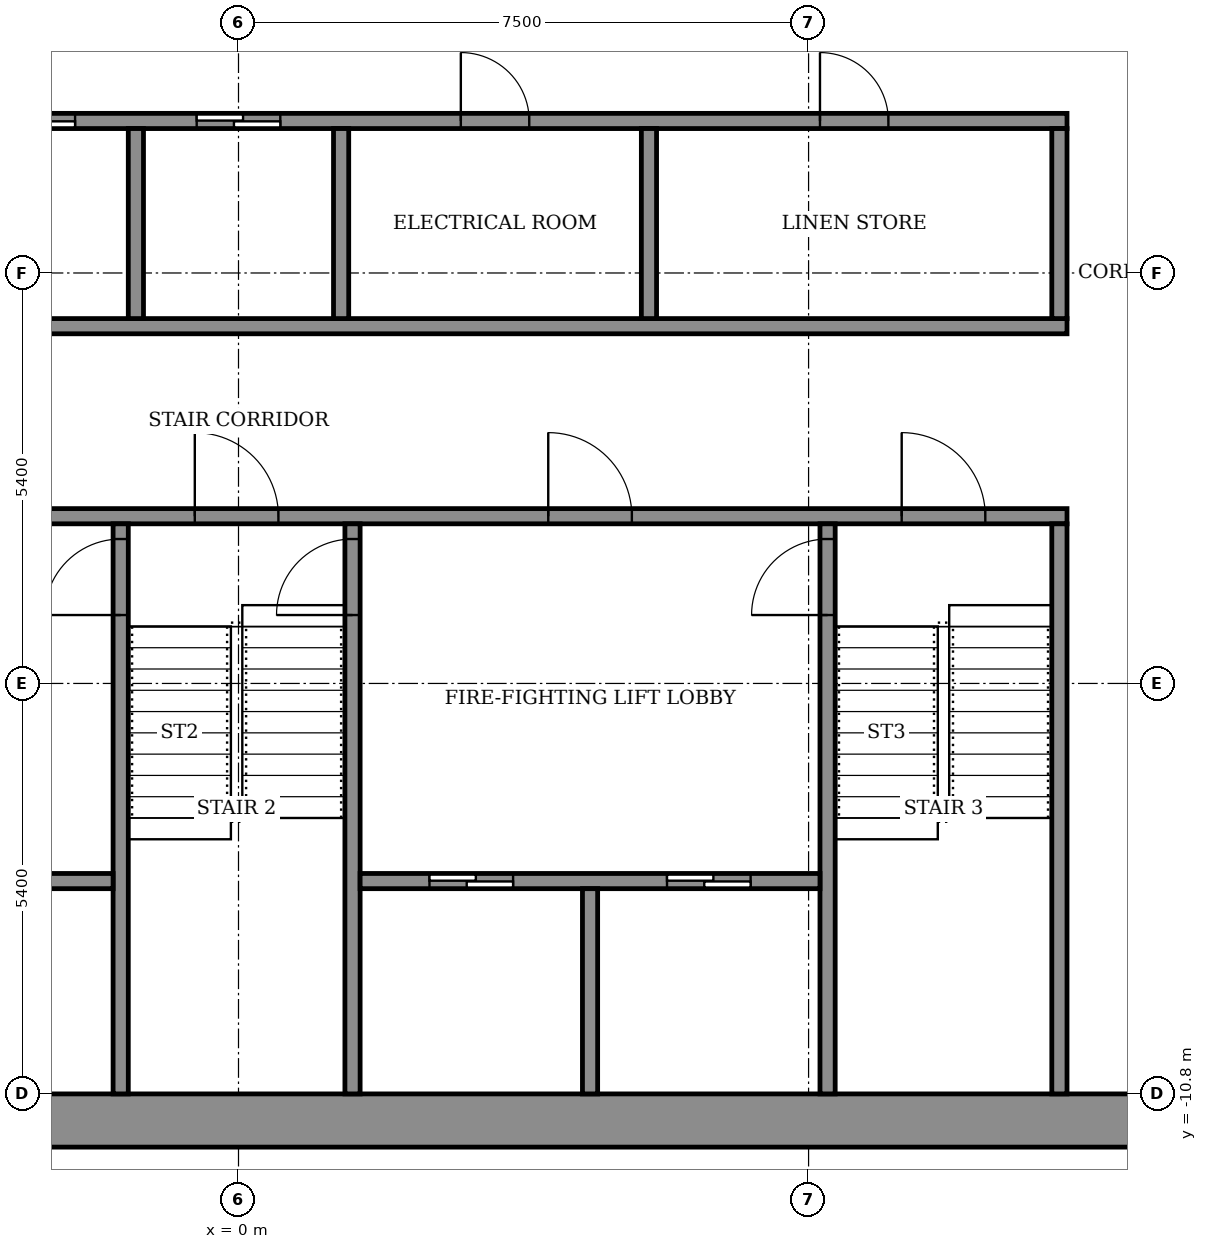
"""IFC4 building model, lengths in metres.
Left out: names, types, materials, properties, quantities, classifications, styles, units other than length and angle.
Written with IfcOpenShell. Run it as: python <this file> out.ifc"""

import sys

from ifc_helpers import new_model, si_unit, direction, frame, frame_2d, origin, place, context, subcontext, project, spatial, rectangle, extrude, element, fill, save


model = new_model("IFC4")
c1 = context("Model", 3, precision=1e-05, world=origin(), true_north=direction((0.0, 1.0)))
c2 = subcontext(c1, "Body", "Model", "MODEL_VIEW")
j1 = project(units=[si_unit("LENGTHUNIT", "METRE"), si_unit("PLANEANGLEUNIT", "RADIAN")], contexts=[c1])
p1 = place(None, origin())
s1 = spatial("IfcSite", under=j1, at=p1, CompositionType="ELEMENT")
p2 = place(p1, origin())
s2 = spatial("IfcBuilding", under=s1, at=p2, CompositionType="ELEMENT")
p3 = place(p2, frame((0.0, 0.0, 271.7)))
s3 = spatial("IfcBuildingStorey", under=s2, at=p3, CompositionType="ELEMENT", Elevation=271.7)
p4 = place(p3, frame((-14.5, -11.15, 0.0), z_axis=(0.0, 0.0, 1.0), x_axis=(1.0, 0.0, 0.0)))
e1 = element("IfcWall", 1, at=p4, inside=s3, PredefinedType="SHEAR", context=c2, shape_type="SweptSolid", body=[
    extrude(rectangle(XDim=29.0, YDim=0.7, at=frame_2d((14.5, 0.0))), origin(), (0.0, 0.0, 1.0), 3.6),
])
p5 = place(p3, frame((-10.9, -3.2, 0.0), z_axis=(0.0, 0.0, 1.0), x_axis=(1.0, 0.0, 0.0)))
e2 = element("IfcWall", 2, at=p5, inside=s3, PredefinedType="SHEAR", context=c2, shape_type="SweptSolid", body=[
    extrude(rectangle(XDim=21.8, YDim=0.2, at=frame_2d((10.9, 0.0))), origin(), (0.0, 0.0, 1.0), 3.05),
])
p6 = place(p5, frame((1.075, 0.0, 0.0)))
e3 = element("IfcOpeningElement", 3, at=p6, cuts=e2, PredefinedType="OPENING", context=c2, shape_type="SweptSolid", body=[
    extrude(rectangle(XDim=1.1, YDim=2.1, at=frame_2d((0.55, 1.05))), frame((0.0, 0.11, 0.0), z_axis=(0.0, -1.0, 0.0), x_axis=(1.0, 0.0, 0.0)), (0.0, 0.0, 1.0), 0.22),
])
p7 = place(p5, frame((10.325, 0.0, 0.0)))
e4 = element("IfcOpeningElement", 4, at=p7, cuts=e2, PredefinedType="OPENING", context=c2, shape_type="SweptSolid", body=[
    extrude(rectangle(XDim=1.1, YDim=2.1, at=frame_2d((0.55, 1.05))), frame((0.0, 0.11, 0.0), z_axis=(0.0, -1.0, 0.0), x_axis=(1.0, 0.0, 0.0)), (0.0, 0.0, 1.0), 0.22),
])
p8 = place(p5, frame((19.625, 0.0, 0.0)))
e5 = element("IfcOpeningElement", 5, at=p8, cuts=e2, PredefinedType="OPENING", context=c2, shape_type="SweptSolid", body=[
    extrude(rectangle(XDim=1.1, YDim=2.1, at=frame_2d((0.55, 1.05))), frame((0.0, 0.11, 0.0), z_axis=(0.0, -1.0, 0.0), x_axis=(1.0, 0.0, 0.0)), (0.0, 0.0, 1.0), 0.22),
])
p9 = place(p5, frame((5.7, 0.0, 0.0)))
e6 = element("IfcOpeningElement", 6, at=p9, cuts=e2, PredefinedType="OPENING", context=c2, shape_type="SweptSolid", body=[
    extrude(rectangle(XDim=1.1, YDim=2.1, at=frame_2d((0.55, 1.05))), frame((0.0, 0.11, 0.0), z_axis=(0.0, -1.0, 0.0), x_axis=(1.0, 0.0, 0.0)), (0.0, 0.0, 1.0), 0.22),
])
p10 = place(p5, frame((14.975, 0.0, 0.0)))
e7 = element("IfcOpeningElement", 7, at=p10, cuts=e2, PredefinedType="OPENING", context=c2, shape_type="SweptSolid", body=[
    extrude(rectangle(XDim=1.1, YDim=2.1, at=frame_2d((0.55, 1.05))), frame((0.0, 0.11, 0.0), z_axis=(0.0, -1.0, 0.0), x_axis=(1.0, 0.0, 0.0)), (0.0, 0.0, 1.0), 0.22),
])
p11 = place(p3, frame((-10.9, -0.7, 0.0), z_axis=(0.0, 0.0, 1.0), x_axis=(1.0, 0.0, 0.0)))
e8 = element("IfcWall", 8, at=p11, inside=s3, PredefinedType="SHEAR", context=c2, shape_type="SweptSolid", body=[
    extrude(rectangle(XDim=21.8, YDim=0.2, at=frame_2d((10.9, 0.0))), origin(), (0.0, 0.0, 1.0), 3.05),
])
p12 = place(p3, frame((-10.9, 2.0, 0.0), z_axis=(0.0, 0.0, 1.0), x_axis=(1.0, 0.0, 0.0)))
e9 = element("IfcWall", 9, at=p12, inside=s3, PredefinedType="SHEAR", context=c2, shape_type="SweptSolid", body=[
    extrude(rectangle(XDim=21.8, YDim=0.2, at=frame_2d((10.9, 0.0))), origin(), (0.0, 0.0, 1.0), 3.05),
])
p13 = place(p12, frame((4.95, 0.0, 0.0)))
e10 = element("IfcOpeningElement", 10, at=p13, cuts=e9, PredefinedType="OPENING", context=c2, shape_type="SweptSolid", body=[
    extrude(rectangle(XDim=1.1, YDim=2.1, at=frame_2d((0.55, 1.05))), frame((0.0, 0.11, 0.0), z_axis=(0.0, -1.0, 0.0), x_axis=(1.0, 0.0, 0.0)), (0.0, 0.0, 1.0), 0.22),
])
p14 = place(p12, frame((7.65, 0.0, 0.0)))
e11 = element("IfcOpeningElement", 11, at=p14, cuts=e9, PredefinedType="OPENING", context=c2, shape_type="SweptSolid", body=[
    extrude(rectangle(XDim=1.1, YDim=2.1, at=frame_2d((0.55, 1.05))), frame((0.0, 0.11, 0.0), z_axis=(0.0, -1.0, 0.0), x_axis=(1.0, 0.0, 0.0)), (0.0, 0.0, 1.0), 0.22),
])
p15 = place(p12, frame((10.35, 0.0, 0.0)))
e12 = element("IfcOpeningElement", 12, at=p15, cuts=e9, PredefinedType="OPENING", context=c2, shape_type="SweptSolid", body=[
    extrude(rectangle(XDim=1.1, YDim=2.1, at=frame_2d((0.55, 1.05))), frame((0.0, 0.11, 0.0), z_axis=(0.0, -1.0, 0.0), x_axis=(1.0, 0.0, 0.0)), (0.0, 0.0, 1.0), 0.22),
])
p16 = place(p12, frame((1.675, 0.0, 0.0)))
e13 = element("IfcOpeningElement", 13, at=p16, cuts=e9, PredefinedType="OPENING", context=c2, shape_type="SweptSolid", body=[
    extrude(rectangle(XDim=0.9, YDim=2.1, at=frame_2d((0.45, 1.05))), frame((0.0, 0.11, 0.0), z_axis=(0.0, -1.0, 0.0), x_axis=(1.0, 0.0, 0.0)), (0.0, 0.0, 1.0), 0.22),
])
p17 = place(p12, frame((13.825, 0.0, 0.0)))
e14 = element("IfcOpeningElement", 14, at=p17, cuts=e9, PredefinedType="OPENING", context=c2, shape_type="SweptSolid", body=[
    extrude(rectangle(XDim=0.9, YDim=2.1, at=frame_2d((0.45, 1.05))), frame((0.0, 0.11, 0.0), z_axis=(0.0, -1.0, 0.0), x_axis=(1.0, 0.0, 0.0)), (0.0, 0.0, 1.0), 0.22),
])
p18 = place(p12, frame((18.55, 0.0, 0.0)))
e15 = element("IfcOpeningElement", 15, at=p18, cuts=e9, PredefinedType="OPENING", context=c2, shape_type="SweptSolid", body=[
    extrude(rectangle(XDim=0.9, YDim=2.1, at=frame_2d((0.45, 1.05))), frame((0.0, 0.11, 0.0), z_axis=(0.0, -1.0, 0.0), x_axis=(1.0, 0.0, 0.0)), (0.0, 0.0, 1.0), 0.22),
])
p19 = place(p3, frame((-1.55, -10.8, 0.0), z_axis=(0.0, 0.0, 1.0), x_axis=(0.0, 1.0, 0.0)))
e16 = element("IfcWall", 16, at=p19, inside=s3, PredefinedType="SHEAR", context=c2, shape_type="SweptSolid", body=[
    extrude(rectangle(XDim=7.5, YDim=0.2, at=frame_2d((3.75, 0.0))), origin(), (0.0, 0.0, 1.0), 3.05),
])
p20 = place(p19, frame((6.3, 0.0, 0.0)))
e17 = element("IfcOpeningElement", 17, at=p20, cuts=e16, PredefinedType="OPENING", context=c2, shape_type="SweptSolid", body=[
    extrude(rectangle(XDim=1.0, YDim=2.1, at=frame_2d((0.5, 1.05))), frame((0.0, 0.11, 0.0), z_axis=(0.0, -1.0, 0.0), x_axis=(1.0, 0.0, 0.0)), (0.0, 0.0, 1.0), 0.22),
])
p21 = place(p3, frame((1.5, -10.8, 0.0), z_axis=(0.0, 0.0, 1.0), x_axis=(0.0, 1.0, 0.0)))
e18 = element("IfcWall", 18, at=p21, inside=s3, PredefinedType="SHEAR", context=c2, shape_type="SweptSolid", body=[
    extrude(rectangle(XDim=7.5, YDim=0.2, at=frame_2d((3.75, 0.0))), origin(), (0.0, 0.0, 1.0), 3.05),
])
p22 = place(p21, frame((6.3, 0.0, 0.0)))
e19 = element("IfcOpeningElement", 19, at=p22, cuts=e18, PredefinedType="OPENING", context=c2, shape_type="SweptSolid", body=[
    extrude(rectangle(XDim=1.0, YDim=2.1, at=frame_2d((0.5, 1.05))), frame((0.0, 0.11, 0.0), z_axis=(0.0, -1.0, 0.0), x_axis=(1.0, 0.0, 0.0)), (0.0, 0.0, 1.0), 0.22),
])
p23 = place(p3, frame((7.75, -10.8, 0.0), z_axis=(0.0, 0.0, 1.0), x_axis=(0.0, 1.0, 0.0)))
e20 = element("IfcWall", 20, at=p23, inside=s3, PredefinedType="SHEAR", context=c2, shape_type="SweptSolid", body=[
    extrude(rectangle(XDim=7.5, YDim=0.2, at=frame_2d((3.75, 0.0))), origin(), (0.0, 0.0, 1.0), 3.05),
])
p24 = place(p23, frame((6.3, 0.0, 0.0)))
e21 = element("IfcOpeningElement", 21, at=p24, cuts=e20, PredefinedType="OPENING", context=c2, shape_type="SweptSolid", body=[
    extrude(rectangle(XDim=1.0, YDim=2.1, at=frame_2d((0.5, 1.05))), frame((0.0, 0.11, 0.0), z_axis=(0.0, -1.0, 0.0), x_axis=(1.0, 0.0, 0.0)), (0.0, 0.0, 1.0), 0.22),
])
p25 = place(p3, frame((10.8, -10.8, 0.0), z_axis=(0.0, 0.0, 1.0), x_axis=(0.0, 1.0, 0.0)))
e22 = element("IfcWall", 22, at=p25, inside=s3, PredefinedType="SHEAR", context=c2, shape_type="SweptSolid", body=[
    extrude(rectangle(XDim=7.5, YDim=0.2, at=frame_2d((3.75, 0.0))), origin(), (0.0, 0.0, 1.0), 3.05),
])
p26 = place(p3, frame((-7.65, -8.0, 0.0), z_axis=(0.0, 0.0, 1.0), x_axis=(1.0, 0.0, 0.0)))
e23 = element("IfcWall", 23, at=p26, inside=s3, PredefinedType="SHEAR", context=c2, shape_type="SweptSolid", body=[
    extrude(rectangle(XDim=6.0, YDim=0.2, at=frame_2d((3.0, 0.0))), origin(), (0.0, 0.0, 1.0), 3.05),
])
p27 = place(p26, frame((0.9, 0.0, 0.0)))
e24 = element("IfcOpeningElement", 24, at=p27, cuts=e23, PredefinedType="OPENING", context=c2, shape_type="SweptSolid", body=[
    extrude(rectangle(XDim=1.1, YDim=2.1, at=frame_2d((0.55, 1.05))), frame((0.0, 0.11, 0.0), z_axis=(0.0, -1.0, 0.0), x_axis=(1.0, 0.0, 0.0)), (0.0, 0.0, 1.0), 0.22),
])
p28 = place(p26, frame((4.0, 0.0, 0.0)))
e25 = element("IfcOpeningElement", 25, at=p28, cuts=e23, PredefinedType="OPENING", context=c2, shape_type="SweptSolid", body=[
    extrude(rectangle(XDim=1.1, YDim=2.1, at=frame_2d((0.55, 1.05))), frame((0.0, 0.11, 0.0), z_axis=(0.0, -1.0, 0.0), x_axis=(1.0, 0.0, 0.0)), (0.0, 0.0, 1.0), 0.22),
])
p29 = place(p3, frame((1.6, -8.0, 0.0), z_axis=(0.0, 0.0, 1.0), x_axis=(1.0, 0.0, 0.0)))
e26 = element("IfcWall", 26, at=p29, inside=s3, PredefinedType="SHEAR", context=c2, shape_type="SweptSolid", body=[
    extrude(rectangle(XDim=6.05, YDim=0.2, at=frame_2d((3.025, 0.0))), origin(), (0.0, 0.0, 1.0), 3.05),
])
p30 = place(p29, frame((0.913, 0.0, 0.0)))
e27 = element("IfcOpeningElement", 27, at=p30, cuts=e26, PredefinedType="OPENING", context=c2, shape_type="SweptSolid", body=[
    extrude(rectangle(XDim=1.1, YDim=2.1, at=frame_2d((0.55, 1.05))), frame((0.0, 0.11, 0.0), z_axis=(0.0, -1.0, 0.0), x_axis=(1.0, 0.0, 0.0)), (0.0, 0.0, 1.0), 0.22),
])
p31 = place(p29, frame((4.038, 0.0, 0.0)))
e28 = element("IfcOpeningElement", 28, at=p31, cuts=e26, PredefinedType="OPENING", context=c2, shape_type="SweptSolid", body=[
    extrude(rectangle(XDim=1.1, YDim=2.1, at=frame_2d((0.55, 1.05))), frame((0.0, 0.11, 0.0), z_axis=(0.0, -1.0, 0.0), x_axis=(1.0, 0.0, 0.0)), (0.0, 0.0, 1.0), 0.22),
])
p32 = place(p3, frame((4.625, -10.8, 0.0), z_axis=(0.0, 0.0, 1.0), x_axis=(0.0, 1.0, 0.0)))
e29 = element("IfcWall", 29, at=p32, inside=s3, PredefinedType="SHEAR", context=c2, shape_type="SweptSolid", body=[
    extrude(rectangle(XDim=2.7, YDim=0.2, at=frame_2d((1.35, 0.0))), origin(), (0.0, 0.0, 1.0), 3.05),
])
for number, where, z_axis, x_axis in (
    (30, (-1.35, -0.6, 0.0), (0.0, 0.0, 1.0), (0.0, 1.0, 0.0)),
    (31, (1.35, -0.6, 0.0), (0.0, 0.0, 1.0), (0.0, 1.0, 0.0)),
):
    element("IfcWall", number, at=place(p3, frame(where, z_axis=z_axis, x_axis=x_axis)), inside=s3, PredefinedType="SHEAR", context=c2, shape_type="SweptSolid", body=[
        extrude(rectangle(XDim=2.5, YDim=0.2, at=frame_2d((1.25, 0.0))), origin(), (0.0, 0.0, 1.0), 3.05),
    ])
for number, where, z_axis, x_axis in (
    (32, (5.4, -0.6, 0.0), (0.0, 0.0, 1.0), (0.0, 1.0, 0.0)),
    (33, (10.8, -0.6, 0.0), (0.0, 0.0, 1.0), (0.0, 1.0, 0.0)),
):
    element("IfcWall", number, at=place(p3, frame(where, z_axis=z_axis, x_axis=x_axis)), inside=s3, PredefinedType="STANDARD", context=c2, shape_type="SweptSolid", body=[
        extrude(rectangle(XDim=2.5, YDim=0.2, at=frame_2d((1.25, 0.0))), origin(), (0.0, 0.0, 1.0), 3.05),
    ])
p33 = place(p14, origin())
e34 = element("IfcDoor", 34, at=p33, inside=s3, OperationType="SLIDING_TO_LEFT", PredefinedType="DOOR", context=c2, shape_type="SweptSolid", body=[
    extrude(rectangle(XDim=1.1, YDim=2.1, at=frame_2d((0.55, 1.05))), frame((0.0, 0.025, 0.0), z_axis=(0.0, -1.0, 0.0), x_axis=(1.0, 0.0, 0.0)), (0.0, 0.0, 1.0), 0.05),
])
fill(e11, e34)
p34 = place(p15, origin())
e35 = element("IfcDoor", 35, at=p34, inside=s3, OperationType="SLIDING_TO_LEFT", PredefinedType="DOOR", context=c2, shape_type="SweptSolid", body=[
    extrude(rectangle(XDim=1.1, YDim=2.1, at=frame_2d((0.55, 1.05))), frame((0.0, 0.025, 0.0), z_axis=(0.0, -1.0, 0.0), x_axis=(1.0, 0.0, 0.0)), (0.0, 0.0, 1.0), 0.05),
])
fill(e12, e35)
p35 = place(p17, origin())
e36 = element("IfcDoor", 36, at=p35, inside=s3, OperationType="SINGLE_SWING_LEFT", PredefinedType="DOOR", context=c2, shape_type="SweptSolid", body=[
    extrude(rectangle(XDim=0.9, YDim=2.1, at=frame_2d((0.45, 1.05))), frame((0.0, 0.025, 0.0), z_axis=(0.0, -1.0, 0.0), x_axis=(1.0, 0.0, 0.0)), (0.0, 0.0, 1.0), 0.05),
])
fill(e14, e36)
p36 = place(p18, origin())
e37 = element("IfcDoor", 37, at=p36, inside=s3, OperationType="SINGLE_SWING_RIGHT", PredefinedType="DOOR", context=c2, shape_type="SweptSolid", body=[
    extrude(rectangle(XDim=0.9, YDim=2.1, at=frame_2d((0.45, 1.05))), frame((0.0, 0.025, 0.0), z_axis=(0.0, -1.0, 0.0), x_axis=(1.0, 0.0, 0.0)), (0.0, 0.0, 1.0), 0.05),
])
fill(e15, e37)
p37 = place(p30, origin())
e38 = element("IfcDoor", 38, at=p37, inside=s3, OperationType="SLIDING_TO_LEFT", PredefinedType="DOOR", context=c2, shape_type="SweptSolid", body=[
    extrude(rectangle(XDim=1.1, YDim=2.1, at=frame_2d((0.55, 1.05))), frame((0.0, 0.025, 0.0), z_axis=(0.0, -1.0, 0.0), x_axis=(1.0, 0.0, 0.0)), (0.0, 0.0, 1.0), 0.05),
])
fill(e27, e38)
p38 = place(p31, origin())
e39 = element("IfcDoor", 39, at=p38, inside=s3, OperationType="SLIDING_TO_LEFT", PredefinedType="DOOR", context=c2, shape_type="SweptSolid", body=[
    extrude(rectangle(XDim=1.1, YDim=2.1, at=frame_2d((0.55, 1.05))), frame((0.0, 0.025, 0.0), z_axis=(0.0, -1.0, 0.0), x_axis=(1.0, 0.0, 0.0)), (0.0, 0.0, 1.0), 0.05),
])
fill(e28, e39)
p39 = place(p7, origin())
e40 = element("IfcDoor", 40, at=p39, inside=s3, OperationType="SINGLE_SWING_RIGHT", PredefinedType="DOOR", context=c2, shape_type="SweptSolid", body=[
    extrude(rectangle(XDim=1.1, YDim=2.1, at=frame_2d((0.55, 1.05))), frame((0.0, 0.025, 0.0), z_axis=(0.0, -1.0, 0.0), x_axis=(1.0, 0.0, 0.0)), (0.0, 0.0, 1.0), 0.05),
])
fill(e4, e40)
p40 = place(p8, origin())
e41 = element("IfcDoor", 41, at=p40, inside=s3, OperationType="SINGLE_SWING_RIGHT", PredefinedType="DOOR", context=c2, shape_type="SweptSolid", body=[
    extrude(rectangle(XDim=1.1, YDim=2.1, at=frame_2d((0.55, 1.05))), frame((0.0, 0.025, 0.0), z_axis=(0.0, -1.0, 0.0), x_axis=(1.0, 0.0, 0.0)), (0.0, 0.0, 1.0), 0.05),
])
fill(e5, e41)
p41 = place(p10, origin())
e42 = element("IfcDoor", 42, at=p41, inside=s3, OperationType="SINGLE_SWING_LEFT", PredefinedType="DOOR", context=c2, shape_type="SweptSolid", body=[
    extrude(rectangle(XDim=1.1, YDim=2.1, at=frame_2d((0.55, 1.05))), frame((0.0, 0.025, 0.0), z_axis=(0.0, -1.0, 0.0), x_axis=(1.0, 0.0, 0.0)), (0.0, 0.0, 1.0), 0.05),
])
fill(e7, e42)
p42 = place(p20, origin())
e43 = element("IfcDoor", 43, at=p42, inside=s3, OperationType="SINGLE_SWING_RIGHT", PredefinedType="DOOR", context=c2, shape_type="SweptSolid", body=[
    extrude(rectangle(XDim=1.0, YDim=2.1, at=frame_2d((0.5, 1.05))), frame((0.0, 0.025, 0.0), z_axis=(0.0, -1.0, 0.0), x_axis=(1.0, 0.0, 0.0)), (0.0, 0.0, 1.0), 0.05),
])
fill(e17, e43)
p43 = place(p22, origin())
e44 = element("IfcDoor", 44, at=p43, inside=s3, OperationType="SINGLE_SWING_RIGHT", PredefinedType="DOOR", context=c2, shape_type="SweptSolid", body=[
    extrude(rectangle(XDim=1.0, YDim=2.1, at=frame_2d((0.5, 1.05))), frame((0.0, 0.025, 0.0), z_axis=(0.0, -1.0, 0.0), x_axis=(1.0, 0.0, 0.0)), (0.0, 0.0, 1.0), 0.05),
])
fill(e19, e44)
p44 = place(p24, origin())
e45 = element("IfcDoor", 45, at=p44, inside=s3, OperationType="SINGLE_SWING_RIGHT", PredefinedType="DOOR", context=c2, shape_type="SweptSolid", body=[
    extrude(rectangle(XDim=1.0, YDim=2.1, at=frame_2d((0.5, 1.05))), frame((0.0, 0.025, 0.0), z_axis=(0.0, -1.0, 0.0), x_axis=(1.0, 0.0, 0.0)), (0.0, 0.0, 1.0), 0.05),
])
fill(e21, e45)
save(model, sys.argv[1])
